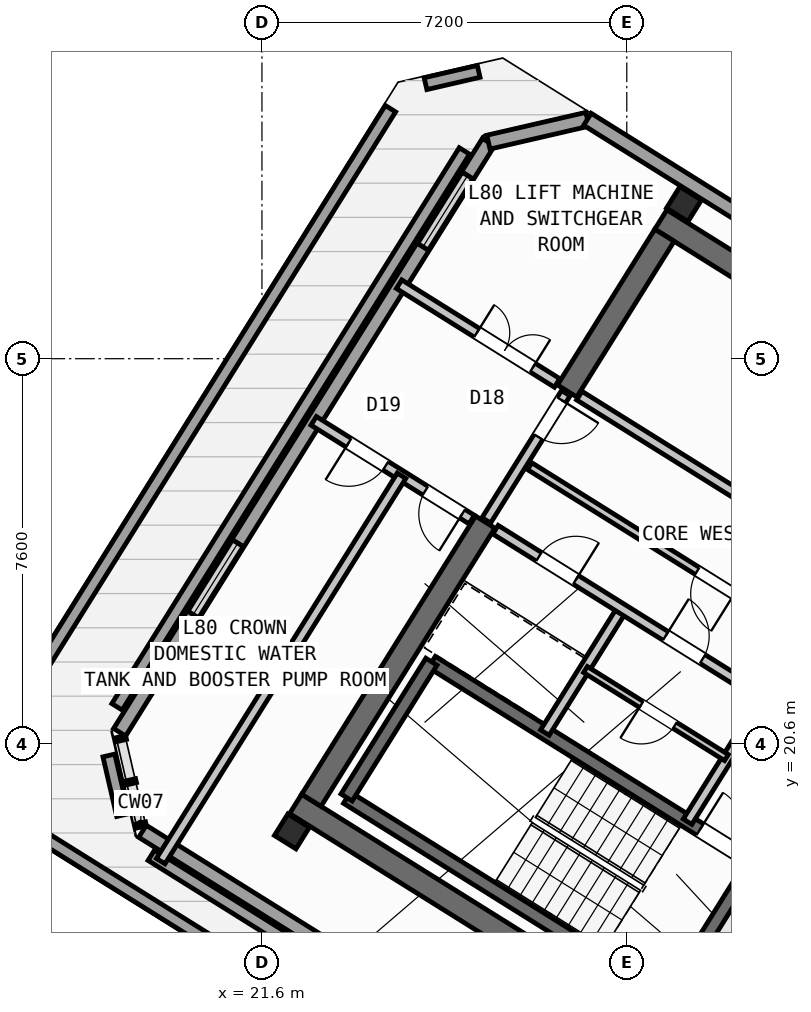
"""IFC4 building model, lengths in metres.
Left out: names, types, materials, properties, quantities, classifications, styles, units other than length and angle.
Written with IfcOpenShell. Run it as: python <this file> out.ifc"""

import sys

from ifc_helpers import new_model, si_unit, direction, frame, frame_2d, origin, origin_2d, place, context, subcontext, project, spatial, rectangle, hollow_rectangle, extrude, source, transform, mapped, element, fill, save


model = new_model("IFC4")
c1 = context("Model", 3, precision=1e-05, world=origin(), true_north=direction((0.0, 1.0)))
c2 = subcontext(c1, "Body", "Model", "MODEL_VIEW")
j1 = project(units=[si_unit("LENGTHUNIT", "METRE"), si_unit("PLANEANGLEUNIT", "RADIAN")], contexts=[c1])
p1 = place(None, origin())
s1 = spatial("IfcSite", under=j1, at=p1, CompositionType="ELEMENT")
p2 = place(p1, origin())
s2 = spatial("IfcBuilding", under=s1, at=p2, CompositionType="ELEMENT")
p3 = place(p2, frame((0.0, 0.0, 313.2)))
s3 = spatial("IfcBuildingStorey", under=s2, at=p3, CompositionType="ELEMENT", Elevation=313.2)
p4 = place(p3, frame((40.531, 24.036, 0.0), z_axis=(0.0, 0.0, 1.0), x_axis=(-0.848048787466, 0.529918157905, 0.0)))
e1 = element("IfcWall", 1, at=p4, inside=s3, PredefinedType="SHEAR", context=c2, shape_type="SweptSolid", body=[
    extrude(rectangle(XDim=13.04, YDim=0.45, at=frame_2d((6.52, 0.0))), origin(), (0.0, 0.0, 1.0), 3.32),
])
p5 = place(p3, frame((33.324, 12.503, 0.0), z_axis=(0.0, 0.0, 1.0), x_axis=(-0.848043529849, 0.529926571782, 0.0)))
e2 = element("IfcWall", 2, at=p5, inside=s3, PredefinedType="SHEAR", context=c2, shape_type="SweptSolid", body=[
    extrude(rectangle(XDim=13.04, YDim=0.45, at=frame_2d((6.52, 0.0))), origin(), (0.0, 0.0, 1.0), 3.32),
])
p6 = place(p3, frame((29.544, 30.636, 0.0), z_axis=(0.0, 0.0, 1.0), x_axis=(-0.529902075036, -0.848058836916, 0.0)))
e3 = element("IfcWall", 3, at=p6, inside=s3, PredefinedType="SHEAR", context=c2, shape_type="SweptSolid", body=[
    extrude(rectangle(XDim=3.625, YDim=0.45, at=frame_2d((1.812, 0.0))), origin(), (0.0, 0.0, 1.0), 3.32),
])
p7 = place(p3, frame((26.007, 24.976, 0.0), z_axis=(0.0, 0.0, 1.0), x_axis=(-0.529931155655, -0.848040665456, 0.0)))
e4 = element("IfcWall", 4, at=p7, inside=s3, PredefinedType="SHEAR", context=c2, shape_type="SweptSolid", body=[
    extrude(rectangle(XDim=6.475, YDim=0.45, at=frame_2d((3.238, 0.0))), origin(), (0.0, 0.0, 1.0), 3.32),
])
m1 = source(origin(), c2, "Body", "SweptSolid", [
    extrude(hollow_rectangle(XDim=0.5, YDim=0.5, WallThickness=0.025, at=origin_2d()), origin(), (0.0, 0.0, 1.0), 3.6),
])
for number, where, z_axis, x_axis in (
    (5, (29.928, 31.251, 0.0), (0.0, 0.0, 1.0), (-0.848, 0.53, 0.0)),
    (6, (22.191, 18.87, 0.0), (0.0, 0.0, 1.0), (-0.848, 0.53, 0.0)),
):
    element("IfcColumn", number, at=place(p3, frame(where, z_axis=z_axis, x_axis=x_axis)), inside=s3, PredefinedType="COLUMN", context=c2, shape_type="MappedRepresentation", body=[
        mapped(m1, transform((0.0, 0.0, 0.0), scale=1.0)),
    ])
p8 = place(p3, frame((30.952, 10.212, 0.0), z_axis=(0.0, 0.0, 1.0), x_axis=(-0.848049555042, 0.529916929521, 0.0)))
e7 = element("IfcWall", 7, at=p8, inside=s3, PredefinedType="PARAPET", context=c2, shape_type="SweptSolid", body=[
    extrude(rectangle(XDim=16.056, YDim=0.24, at=frame_2d((8.028, 0.0))), origin(), (0.0, 0.0, 1.0), 1.15),
])
p9 = place(p3, frame((16.74, 21.3, 0.0), z_axis=(0.0, 0.0, 1.0), x_axis=(0.529921886516, 0.848046457567, 0.0)))
e8 = element("IfcWall", 8, at=p9, inside=s3, PredefinedType="PARAPET", context=c2, shape_type="SweptSolid", body=[
    extrude(rectangle(XDim=13.956, YDim=0.24, at=frame_2d((6.978, 0.0))), origin(), (0.0, 0.0, 1.0), 1.15),
])
p10 = place(p3, frame((24.828, 33.628, 0.0), z_axis=(0.0, 0.0, 1.0), x_axis=(0.974383553348, 0.224892620968, 0.0)))
e9 = element("IfcWall", 9, at=p10, inside=s3, PredefinedType="PARAPET", context=c2, shape_type="SweptSolid", body=[
    extrude(rectangle(XDim=1.077, YDim=0.24, at=frame_2d((0.539, 0.0))), origin(), (0.0, 0.0, 1.0), 1.15),
])
p11 = place(p3, frame((25.595, 32.3, 0.0), z_axis=(0.0, 0.0, 1.0), x_axis=(-0.529919212586, -0.848048128429, 0.0)))
e10 = element("IfcWall", 10, at=p11, inside=s3, PredefinedType="PARAPET", context=c2, shape_type="SweptSolid", body=[
    extrude(rectangle(XDim=12.937, YDim=0.24, at=frame_2d((6.469, 0.0))), origin(), (0.0, 0.0, 1.0), 1.15),
])
p12 = place(p3, frame((18.579, 20.369, 0.0), z_axis=(0.0, 0.0, 1.0), x_axis=(0.224815250156, -0.974401407684, 0.0)))
e11 = element("IfcWall", 11, at=p12, inside=s3, PredefinedType="PARAPET", context=c2, shape_type="SweptSolid", body=[
    extrude(rectangle(XDim=1.209, YDim=0.24, at=frame_2d((0.604, 0.0))), origin(), (0.0, 0.0, 1.0), 1.15),
])
p13 = place(p3, frame((19.416, 18.399, 0.0), z_axis=(0.0, 0.0, 1.0), x_axis=(0.84804953868, -0.529916955705, 0.0)))
e12 = element("IfcWall", 12, at=p13, inside=s3, PredefinedType="PARAPET", context=c2, shape_type="SweptSolid", body=[
    extrude(rectangle(XDim=14.187, YDim=0.24, at=frame_2d((7.094, 0.0))), origin(), (0.0, 0.0, 1.0), 1.15),
])
p14 = place(p3, frame((31.95, 10.932, 0.0), z_axis=(0.0, 0.0, 1.0), x_axis=(-0.848042238523, 0.52992863829, 0.0)))
e13 = element("IfcWall", 13, at=p14, inside=s3, PredefinedType="STANDARD", context=c2, shape_type="SweptSolid", body=[
    extrude(rectangle(XDim=14.984, YDim=0.28, at=frame_2d((7.492, 0.0))), origin(), (0.0, 0.0, 1.0), 3.32),
])
p15 = place(p14, frame((6.283, 0.0, 0.85)))
e14 = element("IfcOpeningElement", 14, at=p15, cuts=e13, PredefinedType="OPENING", context=c2, shape_type="SweptSolid", body=[
    extrude(rectangle(XDim=1.7, YDim=1.6, at=frame_2d((0.85, 0.8))), frame((0.0, 0.15, 0.0), z_axis=(0.0, -1.0, 0.0), x_axis=(1.0, 0.0, 0.0)), (0.0, 0.0, 1.0), 0.3),
])
p16 = place(p3, frame((18.792, 20.827, 0.0), z_axis=(0.0, 0.0, 1.0), x_axis=(0.5299110544, 0.848053226174, 0.0)))
e15 = element("IfcWall", 15, at=p16, inside=s3, PredefinedType="STANDARD", context=c2, shape_type="SweptSolid", body=[
    extrude(rectangle(XDim=13.734, YDim=0.28, at=frame_2d((6.867, 0.0))), origin(), (0.0, 0.0, 1.0), 3.32),
])
p17 = place(p16, frame((2.721, 0.0, 0.85)))
e16 = element("IfcOpeningElement", 16, at=p17, cuts=e15, PredefinedType="OPENING", context=c2, shape_type="SweptSolid", body=[
    extrude(rectangle(XDim=1.7, YDim=1.6, at=frame_2d((0.85, 0.8))), frame((0.0, 0.15, 0.0), z_axis=(0.0, -1.0, 0.0), x_axis=(1.0, 0.0, 0.0)), (0.0, 0.0, 1.0), 0.3),
])
p18 = place(p16, frame((11.278, 0.0, 0.85)))
e17 = element("IfcOpeningElement", 17, at=p18, cuts=e15, PredefinedType="OPENING", context=c2, shape_type="SweptSolid", body=[
    extrude(rectangle(XDim=1.7, YDim=1.6, at=frame_2d((0.85, 0.8))), frame((0.0, 0.15, 0.0), z_axis=(0.0, -1.0, 0.0), x_axis=(1.0, 0.0, 0.0)), (0.0, 0.0, 1.0), 0.3),
])
p19 = place(p3, frame((26.069, 32.474, 0.0), z_axis=(0.0, 0.0, 1.0), x_axis=(0.974393247423, 0.224850615691, 0.0)))
e18 = element("IfcWall", 18, at=p19, inside=s3, PredefinedType="STANDARD", context=c2, shape_type="SweptSolid", body=[
    extrude(rectangle(XDim=2.005, YDim=0.28, at=frame_2d((1.003, 0.0))), origin(), (0.0, 0.0, 1.0), 3.32),
])
p20 = place(p3, frame((28.023, 32.925, 0.0), z_axis=(0.0, 0.0, 1.0), x_axis=(0.848049560819, -0.529916920276, 0.0)))
e19 = element("IfcWall", 19, at=p20, inside=s3, PredefinedType="STANDARD", context=c2, shape_type="SweptSolid", body=[
    extrude(rectangle(XDim=14.984, YDim=0.28, at=frame_2d((7.492, 0.0))), origin(), (0.0, 0.0, 1.0), 3.32),
])
p21 = place(p20, frame((7.968, 0.0, 0.85)))
e20 = element("IfcOpeningElement", 20, at=p21, cuts=e19, PredefinedType="OPENING", context=c2, shape_type="SweptSolid", body=[
    extrude(rectangle(XDim=1.7, YDim=1.6, at=frame_2d((0.85, 0.8))), frame((0.0, 0.15, 0.0), z_axis=(0.0, -1.0, 0.0), x_axis=(1.0, 0.0, 0.0)), (0.0, 0.0, 1.0), 0.3),
])
p22 = place(p3, frame((29.605, 15.581, 0.0), z_axis=(0.0, 0.0, 1.0), x_axis=(-0.848036911448, 0.529937163087, 0.0)))
e21 = element("IfcWall", 21, at=p22, inside=s3, PredefinedType="SHEAR", context=c2, shape_type="SweptSolid", body=[
    extrude(rectangle(XDim=7.46, YDim=0.26, at=frame_2d((3.73, 0.0))), origin(), (0.0, 0.0, 1.0), 3.32),
])
p23 = place(p3, frame((31.28, 18.261, 0.0), z_axis=(0.0, 0.0, 1.0), x_axis=(-0.848051618787, 0.529913626805, 0.0)))
e22 = element("IfcWall", 22, at=p23, inside=s3, PredefinedType="SHEAR", context=c2, shape_type="SweptSolid", body=[
    extrude(rectangle(XDim=7.46, YDim=0.26, at=frame_2d((3.73, 0.0))), origin(), (0.0, 0.0, 1.0), 3.32),
])
p24 = place(p23, frame((0.36, 0.0, 0.0)))
e23 = element("IfcOpeningElement", 23, at=p24, cuts=e22, PredefinedType="OPENING", context=c2, shape_type="SweptSolid", body=[
    extrude(rectangle(XDim=0.86, YDim=2.05, at=frame_2d((0.43, 1.025))), frame((0.0, 0.14, 0.0), z_axis=(0.0, -1.0, 0.0), x_axis=(1.0, 0.0, 0.0)), (0.0, 0.0, 1.0), 0.28),
])
p25 = place(p3, frame((31.288, 18.256, 0.0), z_axis=(0.0, 0.0, 1.0), x_axis=(-0.529943379326, -0.848033026897, 0.0)))
e24 = element("IfcWall", 24, at=p25, inside=s3, PredefinedType="SHEAR", context=c2, shape_type="SweptSolid", body=[
    extrude(rectangle(XDim=3.16, YDim=0.26, at=frame_2d((1.58, 0.0))), origin(), (0.0, 0.0, 1.0), 3.32),
])
p26 = place(p3, frame((24.945, 22.22, 0.0), z_axis=(0.0, 0.0, 1.0), x_axis=(-0.529908658664, -0.84805472316, 0.0)))
e25 = element("IfcWall", 25, at=p26, inside=s3, PredefinedType="SHEAR", context=c2, shape_type="SweptSolid", body=[
    extrude(rectangle(XDim=3.16, YDim=0.26, at=frame_2d((1.58, 0.0))), origin(), (0.0, 0.0, 1.0), 3.32),
])
p27 = place(p3, frame((31.822, 24.998, 0.0), z_axis=(0.0, 0.0, 1.0), x_axis=(-0.848054125777, 0.529909614701, 0.0)))
e26 = element("IfcWall", 26, at=p27, inside=s3, PredefinedType="STANDARD", context=c2, shape_type="SweptSolid", body=[
    extrude(rectangle(XDim=4.668, YDim=0.2, at=frame_2d((2.334, 0.0))), origin(), (0.0, 0.0, 1.0), 3.31),
])
p28 = place(p3, frame((32.108, 22.814, 0.0), z_axis=(0.0, 0.0, 1.0), x_axis=(-0.848047283855, 0.529920564185, 0.0)))
e27 = element("IfcWall", 27, at=p28, inside=s3, PredefinedType="PARTITIONING", context=c2, shape_type="SweptSolid", body=[
    extrude(rectangle(XDim=6.16, YDim=0.16, at=frame_2d((3.08, 0.0))), origin(), (0.0, 0.0, 1.0), 3.31),
])
p29 = place(p28, frame((1.4, 0.0, 0.0)))
e28 = element("IfcOpeningElement", 28, at=p29, cuts=e27, PredefinedType="OPENING", context=c2, shape_type="SweptSolid", body=[
    extrude(rectangle(XDim=0.86, YDim=2.05, at=frame_2d((0.43, 1.025))), frame((0.0, 0.09, 0.0), z_axis=(0.0, -1.0, 0.0), x_axis=(1.0, 0.0, 0.0)), (0.0, 0.0, 1.0), 0.18),
])
for number, where, z_axis, x_axis in (
    (29, (31.525, 21.504, 0.0), (0.0, 0.0, 1.0), (-0.53, -0.848, 0.0)),
    (30, (28.71, 23.263, 0.0), (0.0, 0.0, 1.0), (-0.53, -0.848, 0.0)),
):
    element("IfcWall", number, at=place(p3, frame(where, z_axis=z_axis, x_axis=x_axis)), inside=s3, PredefinedType="STANDARD", context=c2, shape_type="SweptSolid", body=[
        extrude(rectangle(XDim=2.88, YDim=0.2, at=frame_2d((1.44, 0.0))), origin(), (0.0, 0.0, 1.0), 3.31),
    ])
p30 = place(p3, frame((31.525, 21.504, 0.0), z_axis=(0.0, 0.0, 1.0), x_axis=(-0.848042066329, 0.529928913853, 0.0)))
e31 = element("IfcWall", 31, at=p30, inside=s3, PredefinedType="STANDARD", context=c2, shape_type="SweptSolid", body=[
    extrude(rectangle(XDim=6.268, YDim=0.2, at=frame_2d((3.134, 0.0))), origin(), (0.0, 0.0, 1.0), 3.31),
])
p31 = place(p30, frame((4.4, 0.0, 0.0)))
e32 = element("IfcOpeningElement", 32, at=p31, cuts=e31, PredefinedType="OPENING", context=c2, shape_type="SweptSolid", body=[
    extrude(rectangle(XDim=0.86, YDim=2.05, at=frame_2d((0.43, 1.025))), frame((0.0, 0.11, 0.0), z_axis=(0.0, -1.0, 0.0), x_axis=(1.0, 0.0, 0.0)), (0.0, 0.0, 1.0), 0.22),
])
p32 = place(p30, frame((1.45, 0.0, 0.0)))
e33 = element("IfcOpeningElement", 33, at=p32, cuts=e31, PredefinedType="OPENING", context=c2, shape_type="SweptSolid", body=[
    extrude(rectangle(XDim=0.86, YDim=2.05, at=frame_2d((0.43, 1.025))), frame((0.0, 0.11, 0.0), z_axis=(0.0, -1.0, 0.0), x_axis=(1.0, 0.0, 0.0)), (0.0, 0.0, 1.0), 0.22),
])
p33 = place(p3, frame((30.766, 20.327, 0.0), z_axis=(0.0, 0.0, 1.0), x_axis=(-0.848052663127, 0.529911955482, 0.0)))
e34 = element("IfcWall", 34, at=p33, inside=s3, PredefinedType="PLUMBINGWALL", context=c2, shape_type="SweptSolid", body=[
    extrude(rectangle(XDim=3.28, YDim=0.14, at=frame_2d((1.64, 0.0))), origin(), (0.0, 0.0, 1.0), 3.31),
])
p34 = place(p33, frame((1.2, 0.0, 0.0)))
e35 = element("IfcOpeningElement", 35, at=p34, cuts=e34, PredefinedType="OPENING", context=c2, shape_type="SweptSolid", body=[
    extrude(rectangle(XDim=0.78, YDim=2.05, at=frame_2d((0.39, 1.025))), frame((0.0, 0.08, 0.0), z_axis=(0.0, -1.0, 0.0), x_axis=(1.0, 0.0, 0.0)), (0.0, 0.0, 1.0), 0.16),
])
p35 = place(p3, frame((27.596, 27.52, 0.0), z_axis=(0.0, 0.0, 1.0), x_axis=(-0.529865479138, -0.848081702443, 0.0)))
e36 = element("IfcWall", 36, at=p35, inside=s3, PredefinedType="STANDARD", context=c2, shape_type="SweptSolid", body=[
    extrude(rectangle(XDim=2.96, YDim=0.2, at=frame_2d((1.48, 0.0))), origin(), (0.0, 0.0, 1.0), 3.31),
])
p36 = place(p35, frame((0.16, 0.0, 0.0)))
e37 = element("IfcOpeningElement", 37, at=p36, cuts=e36, PredefinedType="OPENING", context=c2, shape_type="SweptSolid", body=[
    extrude(rectangle(XDim=0.86, YDim=2.05, at=frame_2d((0.43, 1.025))), frame((0.0, 0.11, 0.0), z_axis=(0.0, -1.0, 0.0), x_axis=(1.0, 0.0, 0.0)), (0.0, 0.0, 1.0), 0.22),
])
p37 = place(p3, frame((25.74, 25.025, 0.0), z_axis=(0.0, 0.0, 1.0), x_axis=(-0.848057965138, 0.529903470233, 0.0)))
e38 = element("IfcWall", 38, at=p37, inside=s3, PredefinedType="STANDARD", context=c2, shape_type="SweptSolid", body=[
    extrude(rectangle(XDim=3.678, YDim=0.2, at=frame_2d((1.839, 0.0))), origin(), (0.0, 0.0, 1.0), 3.31),
])
p38 = place(p37, frame((0.218, 0.0, 0.0)))
e39 = element("IfcOpeningElement", 39, at=p38, cuts=e38, PredefinedType="OPENING", context=c2, shape_type="SweptSolid", body=[
    extrude(rectangle(XDim=0.86, YDim=2.05, at=frame_2d((0.43, 1.025))), frame((0.0, 0.11, 0.0), z_axis=(0.0, -1.0, 0.0), x_axis=(1.0, 0.0, 0.0)), (0.0, 0.0, 1.0), 0.22),
])
p39 = place(p37, frame((2.003, 0.0, 0.0)))
e40 = element("IfcOpeningElement", 40, at=p39, cuts=e38, PredefinedType="OPENING", context=c2, shape_type="SweptSolid", body=[
    extrude(rectangle(XDim=0.86, YDim=2.05, at=frame_2d((0.43, 1.025))), frame((0.0, 0.11, 0.0), z_axis=(0.0, -1.0, 0.0), x_axis=(1.0, 0.0, 0.0)), (0.0, 0.0, 1.0), 0.22),
])
p40 = place(p3, frame((24.355, 25.89, 0.0), z_axis=(0.0, 0.0, 1.0), x_axis=(-0.529925542399, -0.848044173091, 0.0)))
e41 = element("IfcWall", 41, at=p40, inside=s3, PredefinedType="STANDARD", context=c2, shape_type="SweptSolid", body=[
    extrude(rectangle(XDim=8.97, YDim=0.2, at=frame_2d((4.485, 0.0))), origin(), (0.0, 0.0, 1.0), 3.31),
])
p41 = place(p3, frame((27.425, 27.721, 0.0), z_axis=(0.0, 0.0, 1.0), x_axis=(-0.848057965138, 0.529903470233, 0.0)))
e42 = element("IfcWall", 42, at=p41, inside=s3, PredefinedType="STANDARD", context=c2, shape_type="SweptSolid", body=[
    extrude(rectangle(XDim=3.678, YDim=0.2, at=frame_2d((1.839, 0.0))), origin(), (0.0, 0.0, 1.0), 3.31),
])
p42 = place(p41, frame((0.568, 0.0, 0.0)))
e43 = element("IfcOpeningElement", 43, at=p42, cuts=e42, PredefinedType="OPENING", context=c2, shape_type="SweptSolid", body=[
    extrude(rectangle(XDim=1.3, YDim=2.15, at=frame_2d((0.65, 1.075))), frame((0.0, 0.11, 0.0), z_axis=(0.0, -1.0, 0.0), x_axis=(1.0, 0.0, 0.0)), (0.0, 0.0, 1.0), 0.22),
])
m2 = source(origin(), c2, "Body", "SweptSolid", [
    extrude(rectangle(XDim=1.7, YDim=1.6, at=frame_2d((0.85, 0.8))), frame((0.0, 0.03, 0.0), z_axis=(0.0, -1.0, 0.0), x_axis=(1.0, 0.0, 0.0)), (0.0, 0.0, 1.0), 0.06),
])
p43 = place(p17, origin())
e44 = element("IfcWindow", 44, at=p43, inside=s3, PartitioningType="SINGLE_PANEL", PredefinedType="WINDOW", context=c2, shape_type="MappedRepresentation", body=[
    mapped(m2, transform((0.0, 0.0, 0.0), scale=1.0)),
])
fill(e16, e44)
p44 = place(p18, origin())
e45 = element("IfcWindow", 45, at=p44, inside=s3, PartitioningType="SINGLE_PANEL", PredefinedType="WINDOW", context=c2, shape_type="MappedRepresentation", body=[
    mapped(m2, transform((0.0, 0.0, 0.0), scale=1.0)),
])
fill(e17, e45)
m3 = source(origin(), c2, "Body", "SweptSolid", [
    extrude(rectangle(XDim=0.86, YDim=2.05, at=frame_2d((0.43, 1.025))), frame((0.0, 0.025, 0.0), z_axis=(0.0, -1.0, 0.0), x_axis=(1.0, 0.0, 0.0)), (0.0, 0.0, 1.0), 0.05),
])
p45 = place(p24, frame((0.86, 0.0, 0.0), z_axis=(0.0, 0.0, 1.0), x_axis=(-1.0, 0.0, 0.0)))
e46 = element("IfcDoor", 46, at=p45, inside=s3, OperationType="SINGLE_SWING_LEFT", PredefinedType="DOOR", context=c2, shape_type="MappedRepresentation", body=[
    mapped(m3, transform((0.0, 0.0, 0.0), scale=1.0)),
])
fill(e23, e46)
p46 = place(p29, origin())
e47 = element("IfcDoor", 47, at=p46, inside=s3, OperationType="SINGLE_SWING_LEFT", PredefinedType="DOOR", context=c2, shape_type="MappedRepresentation", body=[
    mapped(m3, transform((0.0, 0.0, 0.0), scale=1.0)),
])
fill(e28, e47)
p47 = place(p31, frame((0.86, 0.0, 0.0), z_axis=(0.0, 0.0, 1.0), x_axis=(-1.0, 0.0, 0.0)))
e48 = element("IfcDoor", 48, at=p47, inside=s3, OperationType="SINGLE_SWING_RIGHT", PredefinedType="DOOR", context=c2, shape_type="MappedRepresentation", body=[
    mapped(m3, transform((0.0, 0.0, 0.0), scale=1.0)),
])
fill(e32, e48)
p48 = place(p32, frame((0.86, 0.0, 0.0), z_axis=(0.0, 0.0, 1.0), x_axis=(-1.0, 0.0, 0.0)))
e49 = element("IfcDoor", 49, at=p48, inside=s3, OperationType="SINGLE_SWING_LEFT", PredefinedType="DOOR", context=c2, shape_type="MappedRepresentation", body=[
    mapped(m3, transform((0.0, 0.0, 0.0), scale=1.0)),
])
fill(e33, e49)
m4 = source(origin(), c2, "Body", "SweptSolid", [
    extrude(rectangle(XDim=0.78, YDim=2.05, at=frame_2d((0.39, 1.025))), frame((0.0, 0.025, 0.0), z_axis=(0.0, -1.0, 0.0), x_axis=(1.0, 0.0, 0.0)), (0.0, 0.0, 1.0), 0.05),
])
p49 = place(p34, origin())
e50 = element("IfcDoor", 50, at=p49, inside=s3, OperationType="SINGLE_SWING_RIGHT", PredefinedType="DOOR", context=c2, shape_type="MappedRepresentation", body=[
    mapped(m4, transform((0.0, 0.0, 0.0), scale=1.0)),
])
fill(e35, e50)
p50 = place(p36, origin())
e51 = element("IfcDoor", 51, at=p50, inside=s3, OperationType="SINGLE_SWING_LEFT", PredefinedType="DOOR", context=c2, shape_type="MappedRepresentation", body=[
    mapped(m3, transform((0.0, 0.0, 0.0), scale=1.0)),
])
fill(e37, e51)
p51 = place(p38, origin())
e52 = element("IfcDoor", 52, at=p51, inside=s3, OperationType="SINGLE_SWING_LEFT", PredefinedType="DOOR", context=c2, shape_type="MappedRepresentation", body=[
    mapped(m3, transform((0.0, 0.0, 0.0), scale=1.0)),
])
fill(e39, e52)
p52 = place(p39, origin())
e53 = element("IfcDoor", 53, at=p52, inside=s3, OperationType="SINGLE_SWING_RIGHT", PredefinedType="DOOR", context=c2, shape_type="MappedRepresentation", body=[
    mapped(m3, transform((0.0, 0.0, 0.0), scale=1.0)),
])
fill(e40, e53)
m5 = source(origin(), c2, "Body", "SweptSolid", [
    extrude(rectangle(XDim=1.3, YDim=2.15, at=frame_2d((0.65, 1.075))), frame((0.0, 0.025, 0.0), z_axis=(0.0, -1.0, 0.0), x_axis=(1.0, 0.0, 0.0)), (0.0, 0.0, 1.0), 0.05),
])
p53 = place(p42, frame((1.3, 0.0, 0.0), z_axis=(0.0, 0.0, 1.0), x_axis=(-1.0, 0.0, 0.0)))
e54 = element("IfcDoor", 54, at=p53, inside=s3, OperationType="DOUBLE_DOOR_SINGLE_SWING", PredefinedType="DOOR", context=c2, shape_type="MappedRepresentation", body=[
    mapped(m5, transform((0.0, 0.0, 0.0), scale=1.0)),
])
fill(e43, e54)
save(model, sys.argv[1])
